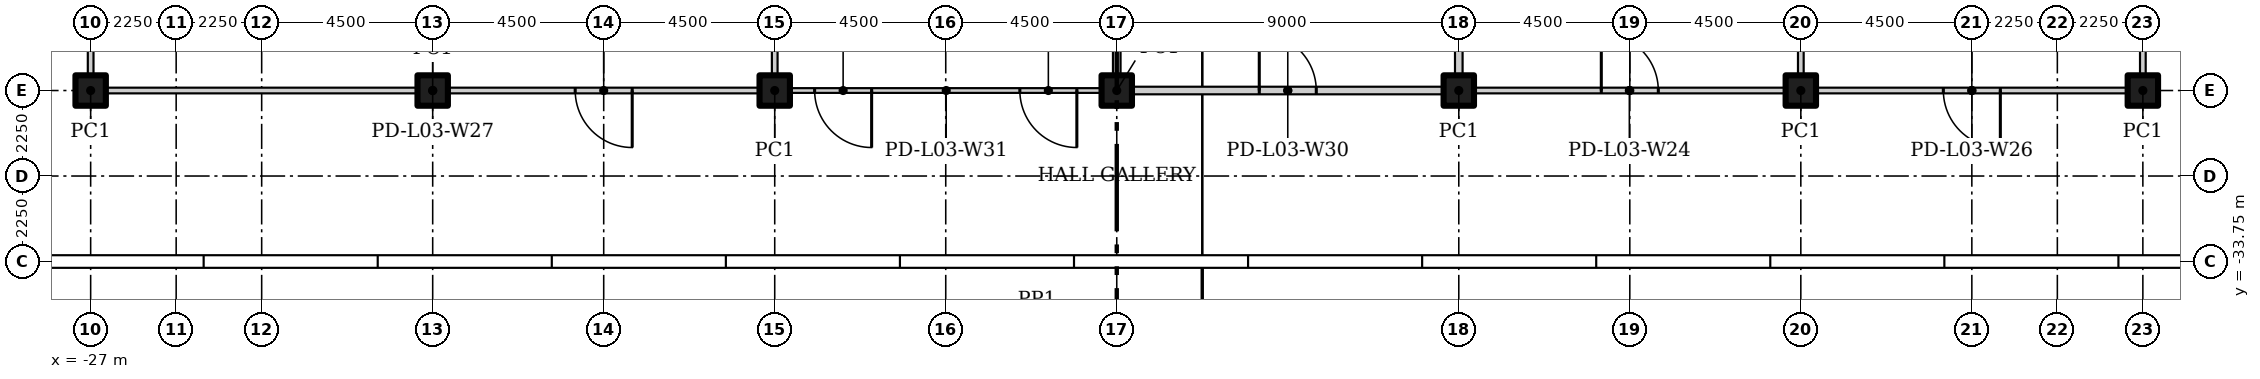
"""IFC4 building model, lengths in metres.
Left out: names, types, materials, properties, quantities, classifications, styles, units other than length and angle.
Written with IfcOpenShell. Run it as: python <this file> out.ifc"""

import sys

from ifc_helpers import new_model, si_unit, direction, frame, frame_2d, origin, origin_2d, place, context, subcontext, project, spatial, rectangle, hollow_rectangle, extrude, element, fill, save


model = new_model("IFC4")
c1 = context("Model", 3, precision=1e-05, world=origin(), true_north=direction((0.0, 1.0)))
c2 = subcontext(c1, "Body", "Model", "MODEL_VIEW")
j1 = project(units=[si_unit("LENGTHUNIT", "METRE"), si_unit("PLANEANGLEUNIT", "RADIAN")], contexts=[c1])
p1 = place(None, origin())
s1 = spatial("IfcSite", under=j1, at=p1, CompositionType="ELEMENT")
p2 = place(p1, origin())
s2 = spatial("IfcBuilding", under=s1, at=p2, CompositionType="ELEMENT")
p3 = place(p2, frame((0.0, 0.0, 18.5)))
s3 = spatial("IfcBuildingStorey", under=s2, at=p3, CompositionType="ELEMENT", Elevation=18.5)
for number, where in (
    (1, (-27.0, -29.25, 0.0)),
    (2, (-18.0, -29.25, 0.0)),
    (3, (-9.0, -29.25, 0.0)),
    (4, (0.0, -29.25, 0.0)),
    (5, (9.0, -29.25, 0.0)),
    (6, (18.0, -29.25, 0.0)),
    (7, (27.0, -29.25, 0.0)),
):
    element("IfcColumn", number, at=place(p3, frame(where)), inside=s3, PredefinedType="COLUMN", context=c2, shape_type="SweptSolid", body=[
        extrude(hollow_rectangle(XDim=0.8, YDim=0.8, WallThickness=0.03, at=origin_2d()), origin(), (0.0, 0.0, 1.0), 4.6),
    ])
p4 = place(p3, frame((-27.0, -29.175, 0.0), z_axis=(0.0, 0.0, 1.0), x_axis=(0.0, 1.0, 0.0)))
e8 = element("IfcWall", 8, at=p4, inside=s3, PredefinedType="PARTITIONING", context=c2, shape_type="SweptSolid", body=[
    extrude(rectangle(XDim=8.85, YDim=0.15, at=frame_2d((4.425, 0.0))), origin(), (0.0, 0.0, 1.0), 4.6),
])
p5 = place(p4, frame((3.075, 0.0, 0.0)))
e9 = element("IfcOpeningElement", 9, at=p5, cuts=e8, PredefinedType="OPENING", context=c2, shape_type="SweptSolid", body=[
    extrude(rectangle(XDim=1.5, YDim=2.1, at=frame_2d((0.75, 1.05))), frame((0.0, 0.085, 0.0), z_axis=(0.0, -1.0, 0.0), x_axis=(1.0, 0.0, 0.0)), (0.0, 0.0, 1.0), 0.17),
])
p6 = place(p3, frame((27.0, -6.75, 0.0), z_axis=(0.0, 0.0, 1.0), x_axis=(0.0, -1.0, 0.0)))
e10 = element("IfcWall", 10, at=p6, inside=s3, PredefinedType="PARTITIONING", context=c2, shape_type="SweptSolid", body=[
    extrude(rectangle(XDim=22.425, YDim=0.15, at=frame_2d((11.212, 0.0))), origin(), (0.0, 0.0, 1.0), 4.6),
])
p7 = place(p6, frame((8.85, 0.0, 0.0)))
e11 = element("IfcOpeningElement", 11, at=p7, cuts=e10, PredefinedType="OPENING", context=c2, shape_type="SweptSolid", body=[
    extrude(rectangle(XDim=1.5, YDim=2.1, at=frame_2d((0.75, 1.05))), frame((0.0, 0.085, 0.0), z_axis=(0.0, -1.0, 0.0), x_axis=(1.0, 0.0, 0.0)), (0.0, 0.0, 1.0), 0.17),
])
p8 = place(p3, frame((8.9, -29.25, 0.0)))
e12 = element("IfcWall", 12, at=p8, inside=s3, PredefinedType="PARTITIONING", context=c2, shape_type="SweptSolid", body=[
    extrude(rectangle(XDim=9.175, YDim=0.15, at=frame_2d((4.587, 0.0))), origin(), (0.0, 0.0, 1.0), 4.6),
])
p9 = place(p8, frame((3.85, 0.0, 0.0)))
e13 = element("IfcOpeningElement", 13, at=p9, cuts=e12, PredefinedType="OPENING", context=c2, shape_type="SweptSolid", body=[
    extrude(rectangle(XDim=1.5, YDim=2.1, at=frame_2d((0.75, 1.05))), frame((0.0, 0.085, 0.0), z_axis=(0.0, -1.0, 0.0), x_axis=(1.0, 0.0, 0.0)), (0.0, 0.0, 1.0), 0.17),
])
p10 = place(p3, frame((27.075, -29.25, 0.0), z_axis=(0.0, 0.0, 1.0), x_axis=(-1.0, 0.0, 0.0)))
e14 = element("IfcWall", 14, at=p10, inside=s3, PredefinedType="PARTITIONING", context=c2, shape_type="SweptSolid", body=[
    extrude(rectangle(XDim=9.15, YDim=0.15, at=frame_2d((4.575, 0.0))), origin(), (0.0, 0.0, 1.0), 4.6),
])
p11 = place(p10, frame((3.825, 0.0, 0.0)))
e15 = element("IfcOpeningElement", 15, at=p11, cuts=e14, PredefinedType="OPENING", context=c2, shape_type="SweptSolid", body=[
    extrude(rectangle(XDim=1.5, YDim=2.1, at=frame_2d((0.75, 1.05))), frame((0.0, 0.085, 0.0), z_axis=(0.0, -1.0, 0.0), x_axis=(1.0, 0.0, 0.0)), (0.0, 0.0, 1.0), 0.17),
])
p12 = place(p3, frame((-8.925, -29.25, 0.0), z_axis=(0.0, 0.0, 1.0), x_axis=(-1.0, 0.0, 0.0)))
e16 = element("IfcWall", 16, at=p12, inside=s3, PredefinedType="PARTITIONING", context=c2, shape_type="SweptSolid", body=[
    extrude(rectangle(XDim=18.15, YDim=0.15, at=frame_2d((9.075, 0.0))), origin(), (0.0, 0.0, 1.0), 4.6),
])
p13 = place(p12, frame((3.825, 0.0, 0.0)))
e17 = element("IfcOpeningElement", 17, at=p13, cuts=e16, PredefinedType="OPENING", context=c2, shape_type="SweptSolid", body=[
    extrude(rectangle(XDim=1.5, YDim=2.1, at=frame_2d((0.75, 1.05))), frame((0.0, 0.085, 0.0), z_axis=(0.0, -1.0, 0.0), x_axis=(1.0, 0.0, 0.0)), (0.0, 0.0, 1.0), 0.17),
])
p14 = place(p3, frame((-0.1, -29.25, 0.0)))
e18 = element("IfcWall", 18, at=p14, inside=s3, PredefinedType="PARTITIONING", context=c2, shape_type="SweptSolid", body=[
    extrude(rectangle(XDim=9.2, YDim=0.2, at=frame_2d((4.6, 0.0))), origin(), (0.0, 0.0, 1.0), 4.6),
])
p15 = place(p14, frame((3.85, 0.0, 0.0)))
e19 = element("IfcOpeningElement", 19, at=p15, cuts=e18, PredefinedType="OPENING", context=c2, shape_type="SweptSolid", body=[
    extrude(rectangle(XDim=1.5, YDim=2.4, at=frame_2d((0.75, 1.2))), frame((0.0, 0.11, 0.0), z_axis=(0.0, -1.0, 0.0), x_axis=(1.0, 0.0, 0.0)), (0.0, 0.0, 1.0), 0.22),
])
p16 = place(p3, frame((0.1, -29.25, 0.0), z_axis=(0.0, 0.0, 1.0), x_axis=(-1.0, 0.0, 0.0)))
e20 = element("IfcWall", 20, at=p16, inside=s3, PredefinedType="PARTITIONING", context=c2, shape_type="SweptSolid", body=[
    extrude(rectangle(XDim=9.175, YDim=0.125, at=frame_2d((4.587, 0.0))), origin(), (0.0, 0.0, 1.0), 4.6),
])
p17 = place(p16, frame((1.15, 0.0, 0.0)))
e21 = element("IfcOpeningElement", 21, at=p17, cuts=e20, PredefinedType="OPENING", context=c2, shape_type="SweptSolid", body=[
    extrude(rectangle(XDim=1.5, YDim=2.1, at=frame_2d((0.75, 1.05))), frame((0.0, 0.073, 0.0), z_axis=(0.0, -1.0, 0.0), x_axis=(1.0, 0.0, 0.0)), (0.0, 0.0, 1.0), 0.145),
])
p18 = place(p16, frame((6.55, 0.0, 0.0)))
e22 = element("IfcOpeningElement", 22, at=p18, cuts=e20, PredefinedType="OPENING", context=c2, shape_type="SweptSolid", body=[
    extrude(rectangle(XDim=1.5, YDim=2.1, at=frame_2d((0.75, 1.05))), frame((0.0, 0.073, 0.0), z_axis=(0.0, -1.0, 0.0), x_axis=(1.0, 0.0, 0.0)), (0.0, 0.0, 1.0), 0.145),
])
p19 = place(p3, frame((18.0, -29.175, 0.0), z_axis=(0.0, 0.0, 1.0), x_axis=(0.0, 1.0, 0.0)))
e23 = element("IfcWall", 23, at=p19, inside=s3, PredefinedType="PARTITIONING", context=c2, shape_type="SweptSolid", body=[
    extrude(rectangle(XDim=22.425, YDim=0.15, at=frame_2d((11.212, 0.0))), origin(), (0.0, 0.0, 1.0), 4.6),
])
p20 = place(p3, frame((9.0, -11.35, 0.0), z_axis=(0.0, 0.0, 1.0), x_axis=(0.0, -1.0, 0.0)))
e24 = element("IfcWall", 24, at=p20, inside=s3, PredefinedType="PARTITIONING", context=c2, shape_type="SweptSolid", body=[
    extrude(rectangle(XDim=17.8, YDim=0.2, at=frame_2d((8.9, 0.0))), origin(), (0.0, 0.0, 1.0), 4.6),
])
p21 = place(p3, frame((-9.0, -29.175, 0.0), z_axis=(0.0, 0.0, 1.0), x_axis=(0.0, 1.0, 0.0)))
e25 = element("IfcWall", 25, at=p21, inside=s3, PredefinedType="PARTITIONING", context=c2, shape_type="SweptSolid", body=[
    extrude(rectangle(XDim=8.85, YDim=0.15, at=frame_2d((4.425, 0.0))), origin(), (0.0, 0.0, 1.0), 4.6),
])
p22 = place(p3, frame((0.0, -20.325, 0.0), z_axis=(0.0, 0.0, 1.0), x_axis=(0.0, -1.0, 0.0)))
e26 = element("IfcWall", 26, at=p22, inside=s3, PredefinedType="PARTITIONING", context=c2, shape_type="SweptSolid", body=[
    extrude(rectangle(XDim=8.825, YDim=0.2, at=frame_2d((4.413, 0.0))), origin(), (0.0, 0.0, 1.0), 4.6),
])
p23 = place(p13, origin())
e27 = element("IfcDoor", 27, at=p23, inside=s3, OperationType="DOUBLE_DOOR_SINGLE_SWING", PredefinedType="DOOR", context=c2, shape_type="SweptSolid", body=[
    extrude(rectangle(XDim=1.5, YDim=2.1, at=frame_2d((0.75, 1.05))), frame((0.0, 0.025, 0.0), z_axis=(0.0, -1.0, 0.0), x_axis=(1.0, 0.0, 0.0)), (0.0, 0.0, 1.0), 0.05),
])
fill(e17, e27)
p24 = place(p17, origin())
e28 = element("IfcDoor", 28, at=p24, inside=s3, OperationType="DOUBLE_DOOR_SINGLE_SWING", PredefinedType="DOOR", context=c2, shape_type="SweptSolid", body=[
    extrude(rectangle(XDim=1.5, YDim=2.1, at=frame_2d((0.75, 1.05))), frame((0.0, 0.025, 0.0), z_axis=(0.0, -1.0, 0.0), x_axis=(1.0, 0.0, 0.0)), (0.0, 0.0, 1.0), 0.05),
])
fill(e21, e28)
p25 = place(p15, origin())
e29 = element("IfcDoor", 29, at=p25, inside=s3, OperationType="DOUBLE_DOOR_SINGLE_SWING", PredefinedType="DOOR", context=c2, shape_type="SweptSolid", body=[
    extrude(rectangle(XDim=1.5, YDim=2.4, at=frame_2d((0.75, 1.2))), frame((0.0, 0.025, 0.0), z_axis=(0.0, -1.0, 0.0), x_axis=(1.0, 0.0, 0.0)), (0.0, 0.0, 1.0), 0.05),
])
fill(e19, e29)
p26 = place(p18, origin())
e30 = element("IfcDoor", 30, at=p26, inside=s3, OperationType="DOUBLE_DOOR_SINGLE_SWING", PredefinedType="DOOR", context=c2, shape_type="SweptSolid", body=[
    extrude(rectangle(XDim=1.5, YDim=2.1, at=frame_2d((0.75, 1.05))), frame((0.0, 0.025, 0.0), z_axis=(0.0, -1.0, 0.0), x_axis=(1.0, 0.0, 0.0)), (0.0, 0.0, 1.0), 0.05),
])
fill(e22, e30)
p27 = place(p9, origin())
e31 = element("IfcDoor", 31, at=p27, inside=s3, OperationType="DOUBLE_DOOR_SINGLE_SWING", PredefinedType="DOOR", context=c2, shape_type="SweptSolid", body=[
    extrude(rectangle(XDim=1.5, YDim=2.1, at=frame_2d((0.75, 1.05))), frame((0.0, 0.025, 0.0), z_axis=(0.0, -1.0, 0.0), x_axis=(1.0, 0.0, 0.0)), (0.0, 0.0, 1.0), 0.05),
])
fill(e13, e31)
p28 = place(p11, origin())
e32 = element("IfcDoor", 32, at=p28, inside=s3, OperationType="DOUBLE_DOOR_SINGLE_SWING", PredefinedType="DOOR", context=c2, shape_type="SweptSolid", body=[
    extrude(rectangle(XDim=1.5, YDim=2.1, at=frame_2d((0.75, 1.05))), frame((0.0, 0.025, 0.0), z_axis=(0.0, -1.0, 0.0), x_axis=(1.0, 0.0, 0.0)), (0.0, 0.0, 1.0), 0.05),
])
fill(e15, e32)
save(model, sys.argv[1])
